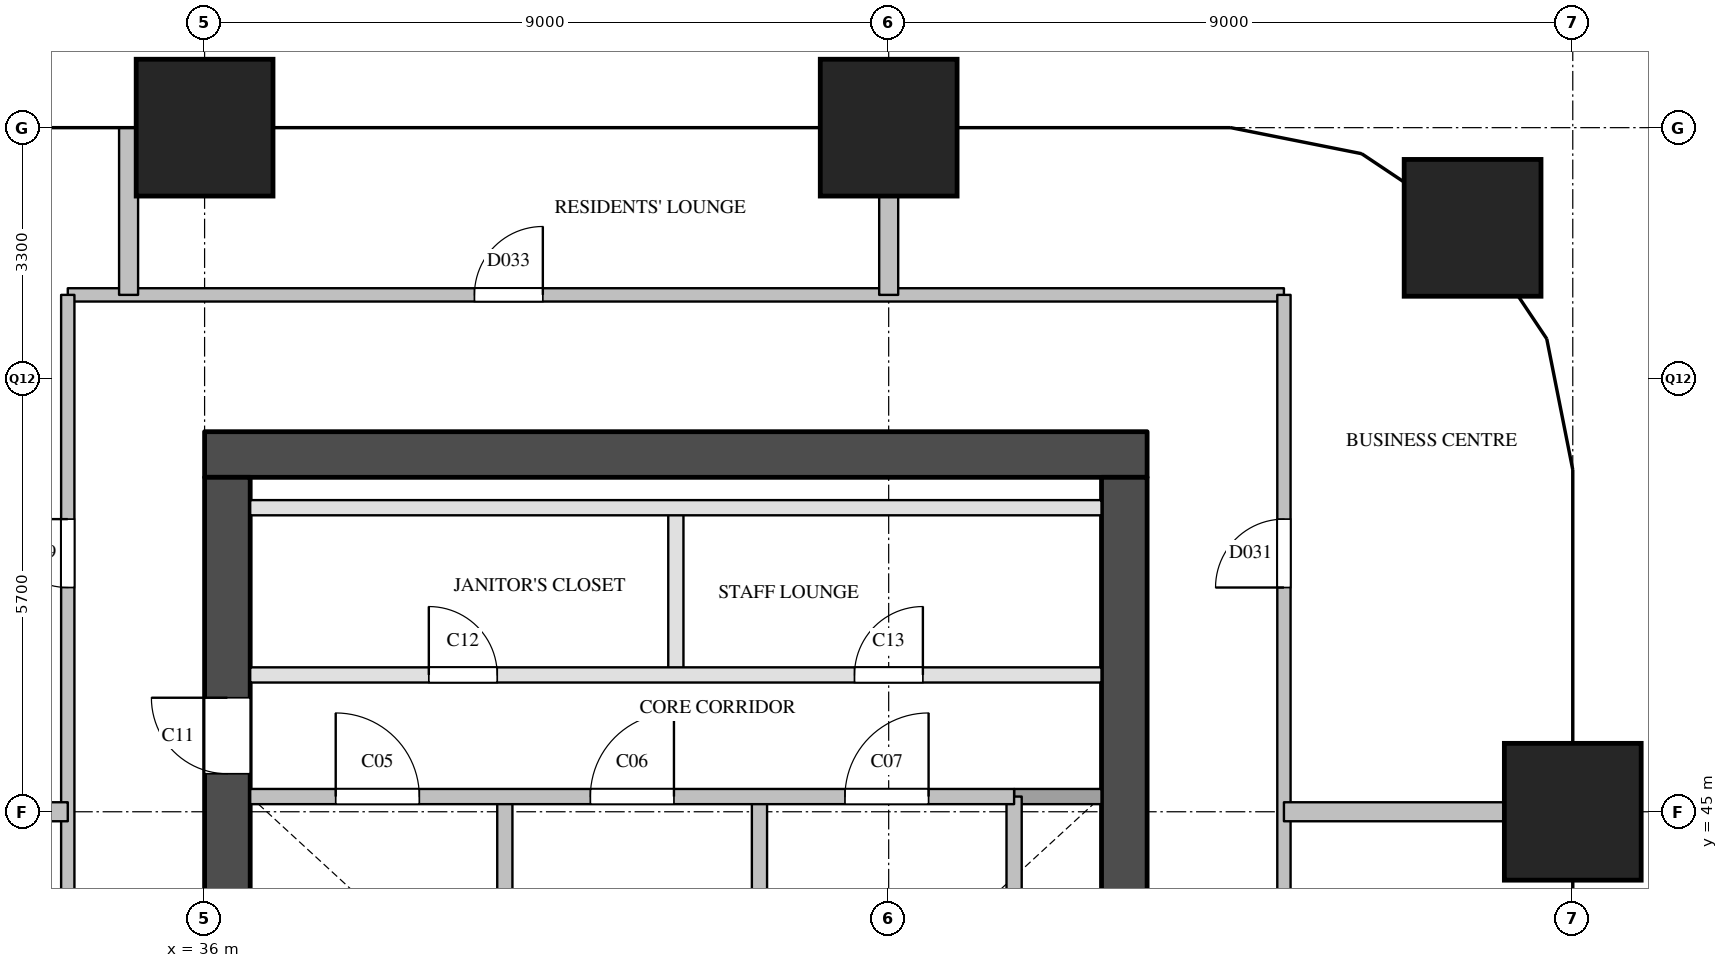
"""IFC4 building model, lengths in metres.
Left out: names, types, materials, properties, quantities, classifications, styles, units other than length and angle.
Written with IfcOpenShell. Run it as: python <this file> out.ifc"""

import sys

from ifc_helpers import new_model, si_unit, direction, frame, frame_2d, origin, origin_2d, place, context, subcontext, project, spatial, rectangle, extrude, element, fill, save


model = new_model("IFC4")
c1 = context("Model", 3, precision=1e-05, world=origin(), true_north=direction((0.0, 1.0)))
c2 = subcontext(c1, "Body", "Model", "MODEL_VIEW")
j1 = project(units=[si_unit("LENGTHUNIT", "METRE"), si_unit("PLANEANGLEUNIT", "RADIAN")], contexts=[c1])
p1 = place(None, origin())
s1 = spatial("IfcSite", under=j1, at=p1, CompositionType="ELEMENT")
p2 = place(p1, origin())
s2 = spatial("IfcBuilding", under=s1, at=p2, CompositionType="ELEMENT")
p3 = place(p2, frame((0.0, 0.0, 119.6)))
s3 = spatial("IfcBuildingStorey", under=s2, at=p3, CompositionType="ELEMENT", Elevation=119.6)
for number, where, z_axis, x_axis in (
    (1, (36.0, 54.0, 0.0), (0.0, 0.0, 1.0), (1.0, 0.0, 0.0)),
    (2, (45.0, 54.0, 0.0), (0.0, 0.0, 1.0), (1.0, 0.0, 0.0)),
    (3, (54.0, 45.0, 0.0), (0.0, 0.0, 1.0), (1.0, 0.0, 0.0)),
    (4, (52.682, 52.682, 0.0), (0.0, 0.0, 1.0), (1.0, 0.0, 0.0)),
):
    element("IfcColumn", number, at=place(p3, frame(where, z_axis=z_axis, x_axis=x_axis)), inside=s3, PredefinedType="COLUMN", context=c2, shape_type="SweptSolid", body=[
        extrude(rectangle(XDim=1.8, YDim=1.8, at=origin_2d()), origin(), (0.0, 0.0, 1.0), 3.8),
    ])
p4 = place(p3, frame((36.0, 49.7, 0.0), z_axis=(0.0, 0.0, 1.0), x_axis=(1.0, 0.0, 0.0)))
e5 = element("IfcWall", 5, at=p4, inside=s3, PredefinedType="SHEAR", context=c2, shape_type="SweptSolid", body=[
    extrude(rectangle(XDim=12.4, YDim=0.6, at=frame_2d((6.2, 0.0))), origin(), (0.0, 0.0, 1.0), 3.3),
])
p5 = place(p3, frame((36.3, 29.1, 0.0), z_axis=(0.0, 0.0, 1.0), x_axis=(0.0, 1.0, 0.0)))
e6 = element("IfcWall", 6, at=p5, inside=s3, PredefinedType="SHEAR", context=c2, shape_type="SweptSolid", body=[
    extrude(rectangle(XDim=20.3, YDim=0.6, at=frame_2d((10.15, 0.0))), origin(), (0.0, 0.0, 1.0), 3.3),
])
p6 = place(p5, frame((3.6, 0.0, 0.0)))
e7 = element("IfcOpeningElement", 7, at=p6, cuts=e6, PredefinedType="OPENING", context=c2, shape_type="SweptSolid", body=[
    extrude(rectangle(XDim=1.8, YDim=2.1, at=frame_2d((0.9, 1.05))), frame((0.0, 0.31, 0.0), z_axis=(0.0, -1.0, 0.0), x_axis=(1.0, 0.0, 0.0)), (0.0, 0.0, 1.0), 0.62),
])
p7 = place(p5, frame((16.4, 0.0, 0.0)))
e8 = element("IfcOpeningElement", 8, at=p7, cuts=e6, PredefinedType="OPENING", context=c2, shape_type="SweptSolid", body=[
    extrude(rectangle(XDim=1.0, YDim=2.1, at=frame_2d((0.5, 1.05))), frame((0.0, 0.31, 0.0), z_axis=(0.0, -1.0, 0.0), x_axis=(1.0, 0.0, 0.0)), (0.0, 0.0, 1.0), 0.62),
])
p8 = place(p3, frame((48.1, 29.1, 0.0), z_axis=(0.0, 0.0, 1.0), x_axis=(0.0, 1.0, 0.0)))
e9 = element("IfcWall", 9, at=p8, inside=s3, PredefinedType="SHEAR", context=c2, shape_type="SweptSolid", body=[
    extrude(rectangle(XDim=20.3, YDim=0.6, at=frame_2d((10.15, 0.0))), origin(), (0.0, 0.0, 1.0), 3.3),
])
p9 = place(p8, frame((12.5, 0.0, 0.0)))
e10 = element("IfcOpeningElement", 10, at=p9, cuts=e9, PredefinedType="OPENING", context=c2, shape_type="SweptSolid", body=[
    extrude(rectangle(XDim=0.7, YDim=2.1, at=frame_2d((0.35, 1.05))), frame((0.0, 0.31, 0.0), z_axis=(0.0, -1.0, 0.0), x_axis=(1.0, 0.0, 0.0)), (0.0, 0.0, 1.0), 0.62),
])
p10 = place(p8, frame((3.9, 0.0, 0.0)))
e11 = element("IfcOpeningElement", 11, at=p10, cuts=e9, PredefinedType="OPENING", context=c2, shape_type="SweptSolid", body=[
    extrude(rectangle(XDim=1.8, YDim=2.1, at=frame_2d((0.9, 1.05))), frame((0.0, 0.31, 0.0), z_axis=(0.0, -1.0, 0.0), x_axis=(1.0, 0.0, 0.0)), (0.0, 0.0, 1.0), 0.62),
])
p11 = place(p3, frame((39.95, 40.78, 0.0), z_axis=(0.0, 0.0, 1.0), x_axis=(0.0, 1.0, 0.0)))
e12 = element("IfcWall", 12, at=p11, inside=s3, PredefinedType="SOLIDWALL", context=c2, shape_type="SweptSolid", body=[
    extrude(rectangle(XDim=4.42, YDim=0.2, at=frame_2d((2.21, 0.0))), origin(), (0.0, 0.0, 1.0), 3.3),
])
p12 = place(p3, frame((42.2, 46.8, 0.0), z_axis=(0.0, 0.0, 1.0), x_axis=(0.0, 1.0, 0.0)))
e13 = element("IfcWall", 13, at=p12, inside=s3, PredefinedType="PARTITIONING", context=c2, shape_type="SweptSolid", body=[
    extrude(rectangle(XDim=2.2, YDim=0.2, at=frame_2d((1.1, 0.0))), origin(), (0.0, 0.0, 1.0), 3.3),
])
for number, where, z_axis, x_axis in (
    (14, (43.3, 40.78, 0.0), (0.0, 0.0, 1.0), (0.0, 1.0, 0.0)),
    (15, (46.65, 40.78, 0.0), (0.0, 0.0, 1.0), (0.0, 1.0, 0.0)),
):
    element("IfcWall", number, at=place(p3, frame(where, z_axis=z_axis, x_axis=x_axis)), inside=s3, PredefinedType="SOLIDWALL", context=c2, shape_type="SweptSolid", body=[
        extrude(rectangle(XDim=4.42, YDim=0.2, at=frame_2d((2.21, 0.0))), origin(), (0.0, 0.0, 1.0), 3.3),
    ])
p13 = place(p3, frame((46.65, 45.2, 0.0), z_axis=(0.0, 0.0, 1.0), x_axis=(1.0, 0.0, 0.0)))
e16 = element("IfcWall", 16, at=p13, inside=s3, PredefinedType="SOLIDWALL", context=c2, shape_type="SweptSolid", body=[
    extrude(rectangle(XDim=1.15, YDim=0.2, at=frame_2d((0.575, 0.0))), origin(), (0.0, 0.0, 1.0), 3.3),
])
p14 = place(p3, frame((36.6, 45.2, 0.0), z_axis=(0.0, 0.0, 1.0), x_axis=(1.0, 0.0, 0.0)))
e17 = element("IfcWall", 17, at=p14, inside=s3, PredefinedType="SOLIDWALL", context=c2, shape_type="SweptSolid", body=[
    extrude(rectangle(XDim=10.05, YDim=0.2, at=frame_2d((5.025, 0.0))), origin(), (0.0, 0.0, 1.0), 3.3),
])
p15 = place(p14, frame((1.125, 0.0, 0.0)))
e18 = element("IfcOpeningElement", 18, at=p15, cuts=e17, PredefinedType="OPENING", context=c2, shape_type="SweptSolid", body=[
    extrude(rectangle(XDim=1.1, YDim=2.1, at=frame_2d((0.55, 1.05))), frame((0.0, 0.11, 0.0), z_axis=(0.0, -1.0, 0.0), x_axis=(1.0, 0.0, 0.0)), (0.0, 0.0, 1.0), 0.22),
])
p16 = place(p14, frame((4.475, 0.0, 0.0)))
e19 = element("IfcOpeningElement", 19, at=p16, cuts=e17, PredefinedType="OPENING", context=c2, shape_type="SweptSolid", body=[
    extrude(rectangle(XDim=1.1, YDim=2.1, at=frame_2d((0.55, 1.05))), frame((0.0, 0.11, 0.0), z_axis=(0.0, -1.0, 0.0), x_axis=(1.0, 0.0, 0.0)), (0.0, 0.0, 1.0), 0.22),
])
p17 = place(p14, frame((7.825, 0.0, 0.0)))
e20 = element("IfcOpeningElement", 20, at=p17, cuts=e17, PredefinedType="OPENING", context=c2, shape_type="SweptSolid", body=[
    extrude(rectangle(XDim=1.1, YDim=2.1, at=frame_2d((0.55, 1.05))), frame((0.0, 0.11, 0.0), z_axis=(0.0, -1.0, 0.0), x_axis=(1.0, 0.0, 0.0)), (0.0, 0.0, 1.0), 0.22),
])
p18 = place(p3, frame((36.6, 46.8, 0.0), z_axis=(0.0, 0.0, 1.0), x_axis=(1.0, 0.0, 0.0)))
e21 = element("IfcWall", 21, at=p18, inside=s3, PredefinedType="PARTITIONING", context=c2, shape_type="SweptSolid", body=[
    extrude(rectangle(XDim=11.2, YDim=0.2, at=frame_2d((5.6, 0.0))), origin(), (0.0, 0.0, 1.0), 3.3),
])
p19 = place(p18, frame((2.35, 0.0, 0.0)))
e22 = element("IfcOpeningElement", 22, at=p19, cuts=e21, PredefinedType="OPENING", context=c2, shape_type="SweptSolid", body=[
    extrude(rectangle(XDim=0.9, YDim=2.1, at=frame_2d((0.45, 1.05))), frame((0.0, 0.11, 0.0), z_axis=(0.0, -1.0, 0.0), x_axis=(1.0, 0.0, 0.0)), (0.0, 0.0, 1.0), 0.22),
])
p20 = place(p18, frame((7.95, 0.0, 0.0)))
e23 = element("IfcOpeningElement", 23, at=p20, cuts=e21, PredefinedType="OPENING", context=c2, shape_type="SweptSolid", body=[
    extrude(rectangle(XDim=0.9, YDim=2.1, at=frame_2d((0.45, 1.05))), frame((0.0, 0.11, 0.0), z_axis=(0.0, -1.0, 0.0), x_axis=(1.0, 0.0, 0.0)), (0.0, 0.0, 1.0), 0.22),
])
p21 = place(p3, frame((36.6, 49.0, 0.0), z_axis=(0.0, 0.0, 1.0), x_axis=(1.0, 0.0, 0.0)))
e24 = element("IfcWall", 24, at=p21, inside=s3, PredefinedType="PARTITIONING", context=c2, shape_type="SweptSolid", body=[
    extrude(rectangle(XDim=11.2, YDim=0.2, at=frame_2d((5.6, 0.0))), origin(), (0.0, 0.0, 1.0), 3.3),
])
p22 = place(p3, frame((34.2, 51.8, 0.0), z_axis=(0.0, 0.0, 1.0), x_axis=(1.0, 0.0, 0.0)))
e25 = element("IfcWall", 25, at=p22, inside=s3, PredefinedType="PARTITIONING", context=c2, shape_type="SweptSolid", body=[
    extrude(rectangle(XDim=16.0, YDim=0.175, at=frame_2d((8.0, 0.0))), origin(), (0.0, 0.0, 1.0), 3.3),
])
p23 = place(p22, frame((5.35, 0.0, 0.0)))
e26 = element("IfcOpeningElement", 26, at=p23, cuts=e25, PredefinedType="OPENING", context=c2, shape_type="SweptSolid", body=[
    extrude(rectangle(XDim=0.9, YDim=2.1, at=frame_2d((0.45, 1.05))), frame((0.0, 0.097, 0.0), z_axis=(0.0, -1.0, 0.0), x_axis=(1.0, 0.0, 0.0)), (0.0, 0.0, 1.0), 0.195),
])
p24 = place(p3, frame((34.2, 40.9, 0.0), z_axis=(0.0, 0.0, 1.0), x_axis=(0.0, 1.0, 0.0)))
e27 = element("IfcWall", 27, at=p24, inside=s3, PredefinedType="PARTITIONING", context=c2, shape_type="SweptSolid", body=[
    extrude(rectangle(XDim=10.9, YDim=0.175, at=frame_2d((5.45, 0.0))), origin(), (0.0, 0.0, 1.0), 3.3),
])
p25 = place(p24, frame((7.05, 0.0, 0.0)))
e28 = element("IfcOpeningElement", 28, at=p25, cuts=e27, PredefinedType="OPENING", context=c2, shape_type="SweptSolid", body=[
    extrude(rectangle(XDim=0.9, YDim=2.1, at=frame_2d((0.45, 1.05))), frame((0.0, 0.097, 0.0), z_axis=(0.0, -1.0, 0.0), x_axis=(1.0, 0.0, 0.0)), (0.0, 0.0, 1.0), 0.195),
])
p26 = place(p3, frame((50.2, 26.7, 0.0), z_axis=(0.0, 0.0, 1.0), x_axis=(0.0, 1.0, 0.0)))
e29 = element("IfcWall", 29, at=p26, inside=s3, PredefinedType="PARTITIONING", context=c2, shape_type="SweptSolid", body=[
    extrude(rectangle(XDim=25.1, YDim=0.175, at=frame_2d((12.55, 0.0))), origin(), (0.0, 0.0, 1.0), 2.3),
])
p27 = place(p26, frame((3.7, 0.0, 0.0)))
e30 = element("IfcOpeningElement", 30, at=p27, cuts=e29, PredefinedType="OPENING", context=c2, shape_type="SweptSolid", body=[
    extrude(rectangle(XDim=0.9, YDim=2.1, at=frame_2d((0.45, 1.05))), frame((0.0, 0.097, 0.0), z_axis=(0.0, -1.0, 0.0), x_axis=(1.0, 0.0, 0.0)), (0.0, 0.0, 1.0), 0.195),
])
p28 = place(p26, frame((12.85, 0.0, 0.0)))
e31 = element("IfcOpeningElement", 31, at=p28, cuts=e29, PredefinedType="OPENING", context=c2, shape_type="SweptSolid", body=[
    extrude(rectangle(XDim=0.9, YDim=2.1, at=frame_2d((0.45, 1.05))), frame((0.0, 0.097, 0.0), z_axis=(0.0, -1.0, 0.0), x_axis=(1.0, 0.0, 0.0)), (0.0, 0.0, 1.0), 0.195),
])
p29 = place(p26, frame((21.25, 0.0, 0.0)))
e32 = element("IfcOpeningElement", 32, at=p29, cuts=e29, PredefinedType="OPENING", context=c2, shape_type="SweptSolid", body=[
    extrude(rectangle(XDim=0.9, YDim=2.1, at=frame_2d((0.45, 1.05))), frame((0.0, 0.097, 0.0), z_axis=(0.0, -1.0, 0.0), x_axis=(1.0, 0.0, 0.0)), (0.0, 0.0, 1.0), 0.195),
])
p30 = place(p3, frame((19.8, 45.0, 0.0), z_axis=(0.0, 0.0, 1.0), x_axis=(1.0, 0.0, 0.0)))
e33 = element("IfcWall", 33, at=p30, inside=s3, PredefinedType="PARTITIONING", context=c2, shape_type="SweptSolid", body=[
    extrude(rectangle(XDim=14.4, YDim=0.25, at=frame_2d((7.2, 0.0))), origin(), (0.0, 0.0, 1.0), 3.3),
])
p31 = place(p3, frame((50.2, 45.0, 0.0), z_axis=(0.0, 0.0, 1.0), x_axis=(1.0, 0.0, 0.0)))
e34 = element("IfcWall", 34, at=p31, inside=s3, PredefinedType="PARTITIONING", context=c2, shape_type="SweptSolid", body=[
    extrude(rectangle(XDim=3.8, YDim=0.25, at=frame_2d((1.9, 0.0))), origin(), (0.0, 0.0, 1.0), 3.3),
])
p32 = place(p3, frame((35.0, 51.8, 0.0), z_axis=(0.0, 0.0, 1.0), x_axis=(0.0, 1.0, 0.0)))
e35 = element("IfcWall", 35, at=p32, inside=s3, PredefinedType="PARTITIONING", context=c2, shape_type="SweptSolid", body=[
    extrude(rectangle(XDim=2.2, YDim=0.25, at=frame_2d((1.1, 0.0))), origin(), (0.0, 0.0, 1.0), 2.3),
])
p33 = place(p3, frame((45.0, 51.8, 0.0), z_axis=(0.0, 0.0, 1.0), x_axis=(0.0, 1.0, 0.0)))
e36 = element("IfcWall", 36, at=p33, inside=s3, PredefinedType="PARTITIONING", context=c2, shape_type="SweptSolid", body=[
    extrude(rectangle(XDim=2.2, YDim=0.25, at=frame_2d((1.1, 0.0))), origin(), (0.0, 0.0, 1.0), 3.3),
])
p34 = place(p15, origin())
e37 = element("IfcDoor", 37, at=p34, inside=s3, OperationType="SINGLE_SWING_LEFT", PredefinedType="DOOR", context=c2, shape_type="SweptSolid", body=[
    extrude(rectangle(XDim=1.1, YDim=2.1, at=frame_2d((0.55, 1.05))), frame((0.0, 0.025, 0.0), z_axis=(0.0, -1.0, 0.0), x_axis=(1.0, 0.0, 0.0)), (0.0, 0.0, 1.0), 0.05),
])
fill(e18, e37)
p35 = place(p16, origin())
e38 = element("IfcDoor", 38, at=p35, inside=s3, OperationType="SINGLE_SWING_RIGHT", PredefinedType="DOOR", context=c2, shape_type="SweptSolid", body=[
    extrude(rectangle(XDim=1.1, YDim=2.1, at=frame_2d((0.55, 1.05))), frame((0.0, 0.025, 0.0), z_axis=(0.0, -1.0, 0.0), x_axis=(1.0, 0.0, 0.0)), (0.0, 0.0, 1.0), 0.05),
])
fill(e19, e38)
p36 = place(p17, origin())
e39 = element("IfcDoor", 39, at=p36, inside=s3, OperationType="SINGLE_SWING_RIGHT", PredefinedType="DOOR", context=c2, shape_type="SweptSolid", body=[
    extrude(rectangle(XDim=1.1, YDim=2.1, at=frame_2d((0.55, 1.05))), frame((0.0, 0.025, 0.0), z_axis=(0.0, -1.0, 0.0), x_axis=(1.0, 0.0, 0.0)), (0.0, 0.0, 1.0), 0.05),
])
fill(e20, e39)
p37 = place(p7, origin())
e40 = element("IfcDoor", 40, at=p37, inside=s3, OperationType="SINGLE_SWING_RIGHT", PredefinedType="DOOR", context=c2, shape_type="SweptSolid", body=[
    extrude(rectangle(XDim=1.0, YDim=2.1, at=frame_2d((0.5, 1.05))), frame((0.0, 0.025, 0.0), z_axis=(0.0, -1.0, 0.0), x_axis=(1.0, 0.0, 0.0)), (0.0, 0.0, 1.0), 0.05),
])
fill(e8, e40)
p38 = place(p19, origin())
e41 = element("IfcDoor", 41, at=p38, inside=s3, OperationType="SINGLE_SWING_LEFT", PredefinedType="DOOR", context=c2, shape_type="SweptSolid", body=[
    extrude(rectangle(XDim=0.9, YDim=2.1, at=frame_2d((0.45, 1.05))), frame((0.0, 0.025, 0.0), z_axis=(0.0, -1.0, 0.0), x_axis=(1.0, 0.0, 0.0)), (0.0, 0.0, 1.0), 0.05),
])
fill(e22, e41)
p39 = place(p20, origin())
e42 = element("IfcDoor", 42, at=p39, inside=s3, OperationType="SINGLE_SWING_RIGHT", PredefinedType="DOOR", context=c2, shape_type="SweptSolid", body=[
    extrude(rectangle(XDim=0.9, YDim=2.1, at=frame_2d((0.45, 1.05))), frame((0.0, 0.025, 0.0), z_axis=(0.0, -1.0, 0.0), x_axis=(1.0, 0.0, 0.0)), (0.0, 0.0, 1.0), 0.05),
])
fill(e23, e42)
p40 = place(p25, origin())
e43 = element("IfcDoor", 43, at=p40, inside=s3, OperationType="SINGLE_SWING_RIGHT", PredefinedType="DOOR", context=c2, shape_type="SweptSolid", body=[
    extrude(rectangle(XDim=0.9, YDim=2.1, at=frame_2d((0.45, 1.05))), frame((0.0, 0.025, 0.0), z_axis=(0.0, -1.0, 0.0), x_axis=(1.0, 0.0, 0.0)), (0.0, 0.0, 1.0), 0.05),
])
fill(e28, e43)
p41 = place(p29, origin())
e44 = element("IfcDoor", 44, at=p41, inside=s3, OperationType="SINGLE_SWING_LEFT", PredefinedType="DOOR", context=c2, shape_type="SweptSolid", body=[
    extrude(rectangle(XDim=0.9, YDim=2.1, at=frame_2d((0.45, 1.05))), frame((0.0, 0.025, 0.0), z_axis=(0.0, -1.0, 0.0), x_axis=(1.0, 0.0, 0.0)), (0.0, 0.0, 1.0), 0.05),
])
fill(e32, e44)
p42 = place(p23, origin())
e45 = element("IfcDoor", 45, at=p42, inside=s3, OperationType="SINGLE_SWING_RIGHT", PredefinedType="DOOR", context=c2, shape_type="SweptSolid", body=[
    extrude(rectangle(XDim=0.9, YDim=2.1, at=frame_2d((0.45, 1.05))), frame((0.0, 0.025, 0.0), z_axis=(0.0, -1.0, 0.0), x_axis=(1.0, 0.0, 0.0)), (0.0, 0.0, 1.0), 0.05),
])
fill(e26, e45)
save(model, sys.argv[1])
